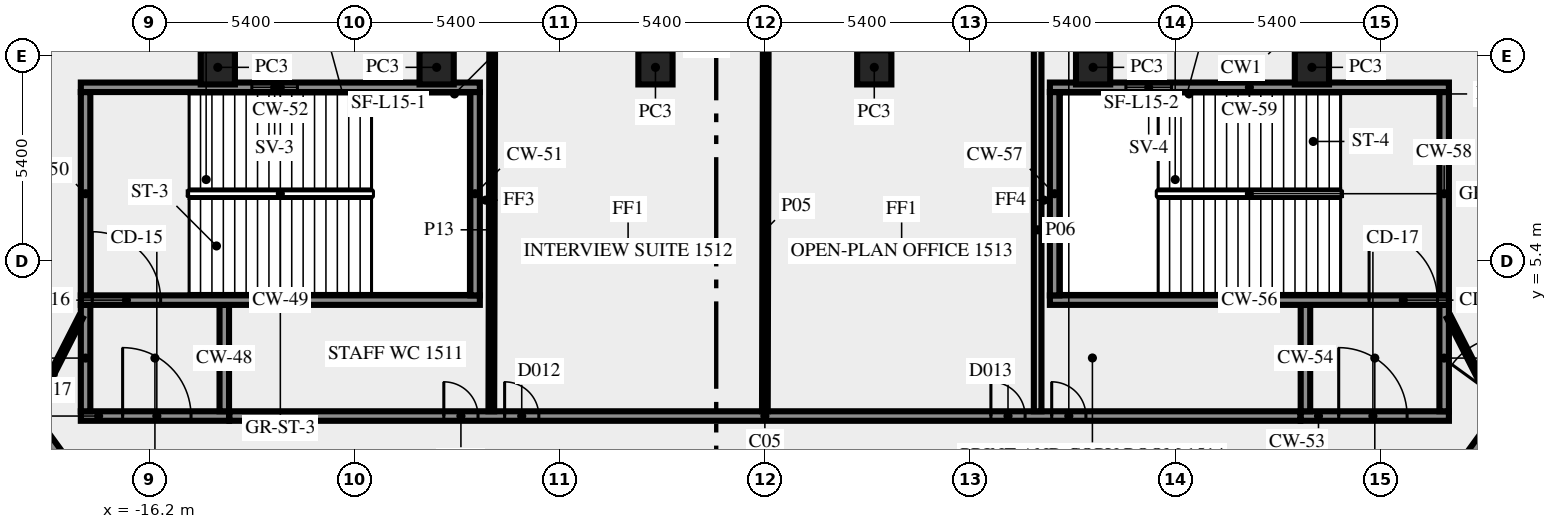
"""IFC4 building model, lengths in metres.
Left out: names, types, materials, properties, quantities, classifications, styles, units other than length and angle.
Written with IfcOpenShell. Run it as: python <this file> out.ifc"""

import sys

from ifc_helpers import new_model, si_unit, direction, frame, frame_2d, origin, origin_2d, place, context, subcontext, project, spatial, rectangle, extrude, element, fill, save


model = new_model("IFC4")
c1 = context("Model", 3, precision=1e-05, world=origin(), true_north=direction((0.0, 1.0)))
c2 = subcontext(c1, "Body", "Model", "MODEL_VIEW")
j1 = project(units=[si_unit("LENGTHUNIT", "METRE"), si_unit("PLANEANGLEUNIT", "RADIAN")], contexts=[c1])
p1 = place(None, origin())
s1 = spatial("IfcSite", under=j1, at=p1, CompositionType="ELEMENT")
p2 = place(p1, origin())
s2 = spatial("IfcBuilding", under=s1, at=p2, CompositionType="ELEMENT")
p3 = place(p2, frame((0.0, 0.0, 67.0)))
s3 = spatial("IfcBuildingStorey", under=s2, at=p3, CompositionType="ELEMENT", Elevation=67.0)
for number, where, z_axis, x_axis in (
    (1, (14.395, 10.5, 0.0), (0.0, 0.0, 1.0), (-1.0, 0.0, 0.0)),
    (2, (8.637, 10.5, 0.0), (0.0, 0.0, 1.0), (-1.0, 0.0, 0.0)),
    (3, (2.879, 10.5, 0.0), (0.0, 0.0, 1.0), (-1.0, 0.0, 0.0)),
    (4, (-2.879, 10.5, 0.0), (0.0, 0.0, 1.0), (-1.0, 0.0, 0.0)),
    (5, (-8.637, 10.5, 0.0), (0.0, 0.0, 1.0), (-1.0, 0.0, 0.0)),
    (6, (-14.395, 10.5, 0.0), (0.0, 0.0, 1.0), (-1.0, 0.0, 0.0)),
):
    element("IfcColumn", number, at=place(p3, frame(where, z_axis=z_axis, x_axis=x_axis)), inside=s3, PredefinedType="COLUMN", context=c2, shape_type="SweptSolid", body=[
        extrude(rectangle(XDim=0.9, YDim=0.9, at=origin_2d()), origin(), (0.0, 0.0, 1.0), 3.65),
    ])
p4 = place(p3, frame((-18.0, 1.325, 0.0), z_axis=(0.0, 0.0, 1.0), x_axis=(1.0, 0.0, 0.0)))
e7 = element("IfcWall", 7, at=p4, inside=s3, PredefinedType="SHEAR", context=c2, shape_type="SweptSolid", body=[
    extrude(rectangle(XDim=3.9, YDim=0.25, at=frame_2d((1.95, 0.0))), origin(), (0.0, 0.0, 1.0), 3.65),
])
p5 = place(p4, frame((1.1, 0.0, 0.0)))
e8 = element("IfcOpeningElement", 8, at=p5, cuts=e7, PredefinedType="OPENING", context=c2, shape_type="SweptSolid", body=[
    extrude(rectangle(XDim=1.8, YDim=2.1, at=frame_2d((0.9, 1.05))), frame((0.0, 0.135, 0.0), z_axis=(0.0, -1.0, 0.0), x_axis=(1.0, 0.0, 0.0)), (0.0, 0.0, 1.0), 0.27),
])
for number, where, z_axis, x_axis in (
    (9, (-17.875, 1.45, 0.0), (0.0, 0.0, 1.0), (0.0, 1.0, 0.0)),
    (10, (-14.225, 1.45, 0.0), (0.0, 0.0, 1.0), (0.0, 1.0, 0.0)),
):
    element("IfcWall", number, at=place(p3, frame(where, z_axis=z_axis, x_axis=x_axis)), inside=s3, PredefinedType="SHEAR", context=c2, shape_type="SweptSolid", body=[
        extrude(rectangle(XDim=2.8, YDim=0.25, at=frame_2d((1.4, 0.0))), origin(), (0.0, 0.0, 1.0), 3.65),
    ])
p6 = place(p3, frame((-18.0, 4.375, 0.0), z_axis=(0.0, 0.0, 1.0), x_axis=(1.0, 0.0, 0.0)))
e11 = element("IfcWall", 11, at=p6, inside=s3, PredefinedType="SHEAR", context=c2, shape_type="SweptSolid", body=[
    extrude(rectangle(XDim=10.5, YDim=0.25, at=frame_2d((5.25, 0.0))), origin(), (0.0, 0.0, 1.0), 3.65),
])
p7 = place(p6, frame((0.3, 0.0, 0.0)))
e12 = element("IfcOpeningElement", 12, at=p7, cuts=e11, PredefinedType="OPENING", context=c2, shape_type="SweptSolid", body=[
    extrude(rectangle(XDim=1.8, YDim=2.1, at=frame_2d((0.9, 1.05))), frame((0.0, 0.135, 0.0), z_axis=(0.0, -1.0, 0.0), x_axis=(1.0, 0.0, 0.0)), (0.0, 0.0, 1.0), 0.27),
])
for number, where, z_axis, x_axis in (
    (13, (-17.875, 4.5, 0.0), (0.0, 0.0, 1.0), (0.0, 1.0, 0.0)),
    (14, (-7.625, 4.5, 0.0), (0.0, 0.0, 1.0), (0.0, 1.0, 0.0)),
):
    element("IfcWall", number, at=place(p3, frame(where, z_axis=z_axis, x_axis=x_axis)), inside=s3, PredefinedType="SHEAR", context=c2, shape_type="SweptSolid", body=[
        extrude(rectangle(XDim=5.35, YDim=0.25, at=frame_2d((2.675, 0.0))), origin(), (0.0, 0.0, 1.0), 3.65),
    ])
p8 = place(p3, frame((-18.0, 9.975, 0.0), z_axis=(0.0, 0.0, 1.0), x_axis=(1.0, 0.0, 0.0)))
e15 = element("IfcWall", 15, at=p8, inside=s3, PredefinedType="SHEAR", context=c2, shape_type="SweptSolid", body=[
    extrude(rectangle(XDim=10.5, YDim=0.25, at=frame_2d((5.25, 0.0))), origin(), (0.0, 0.0, 1.0), 3.65),
])
p9 = place(p8, frame((4.5, 0.0, 1.0)))
e16 = element("IfcOpeningElement", 16, at=p9, cuts=e15, PredefinedType="OPENING", context=c2, shape_type="SweptSolid", body=[
    extrude(rectangle(XDim=1.2, YDim=1.2, at=frame_2d((0.6, 0.6))), frame((0.0, 0.135, 0.0), z_axis=(0.0, -1.0, 0.0), x_axis=(1.0, 0.0, 0.0)), (0.0, 0.0, 1.0), 0.27),
])
p10 = place(p3, frame((14.1, 1.325, 0.0), z_axis=(0.0, 0.0, 1.0), x_axis=(1.0, 0.0, 0.0)))
e17 = element("IfcWall", 17, at=p10, inside=s3, PredefinedType="SHEAR", context=c2, shape_type="SweptSolid", body=[
    extrude(rectangle(XDim=3.9, YDim=0.25, at=frame_2d((1.95, 0.0))), origin(), (0.0, 0.0, 1.0), 3.65),
])
p11 = place(p10, frame((1.0, 0.0, 0.0)))
e18 = element("IfcOpeningElement", 18, at=p11, cuts=e17, PredefinedType="OPENING", context=c2, shape_type="SweptSolid", body=[
    extrude(rectangle(XDim=1.8, YDim=2.1, at=frame_2d((0.9, 1.05))), frame((0.0, 0.135, 0.0), z_axis=(0.0, -1.0, 0.0), x_axis=(1.0, 0.0, 0.0)), (0.0, 0.0, 1.0), 0.27),
])
for number, where, z_axis, x_axis in (
    (19, (14.225, 1.45, 0.0), (0.0, 0.0, 1.0), (0.0, 1.0, 0.0)),
    (20, (17.875, 1.45, 0.0), (0.0, 0.0, 1.0), (0.0, 1.0, 0.0)),
):
    element("IfcWall", number, at=place(p3, frame(where, z_axis=z_axis, x_axis=x_axis)), inside=s3, PredefinedType="SHEAR", context=c2, shape_type="SweptSolid", body=[
        extrude(rectangle(XDim=2.8, YDim=0.25, at=frame_2d((1.4, 0.0))), origin(), (0.0, 0.0, 1.0), 3.65),
    ])
p12 = place(p3, frame((7.5, 4.375, 0.0), z_axis=(0.0, 0.0, 1.0), x_axis=(1.0, 0.0, 0.0)))
e21 = element("IfcWall", 21, at=p12, inside=s3, PredefinedType="SHEAR", context=c2, shape_type="SweptSolid", body=[
    extrude(rectangle(XDim=10.5, YDim=0.25, at=frame_2d((5.25, 0.0))), origin(), (0.0, 0.0, 1.0), 3.65),
])
p13 = place(p12, frame((8.4, 0.0, 0.0)))
e22 = element("IfcOpeningElement", 22, at=p13, cuts=e21, PredefinedType="OPENING", context=c2, shape_type="SweptSolid", body=[
    extrude(rectangle(XDim=1.8, YDim=2.1, at=frame_2d((0.9, 1.05))), frame((0.0, 0.135, 0.0), z_axis=(0.0, -1.0, 0.0), x_axis=(1.0, 0.0, 0.0)), (0.0, 0.0, 1.0), 0.27),
])
for number, where, z_axis, x_axis in (
    (23, (7.625, 4.5, 0.0), (0.0, 0.0, 1.0), (0.0, 1.0, 0.0)),
    (24, (17.875, 4.5, 0.0), (0.0, 0.0, 1.0), (0.0, 1.0, 0.0)),
):
    element("IfcWall", number, at=place(p3, frame(where, z_axis=z_axis, x_axis=x_axis)), inside=s3, PredefinedType="SHEAR", context=c2, shape_type="SweptSolid", body=[
        extrude(rectangle(XDim=5.35, YDim=0.25, at=frame_2d((2.675, 0.0))), origin(), (0.0, 0.0, 1.0), 3.65),
    ])
p14 = place(p3, frame((7.5, 9.975, 0.0), z_axis=(0.0, 0.0, 1.0), x_axis=(1.0, 0.0, 0.0)))
e25 = element("IfcWall", 25, at=p14, inside=s3, PredefinedType="SHEAR", context=c2, shape_type="SweptSolid", body=[
    extrude(rectangle(XDim=10.5, YDim=0.25, at=frame_2d((5.25, 0.0))), origin(), (0.0, 0.0, 1.0), 3.65),
])
p15 = place(p14, frame((2.0, 0.0, 1.0)))
e26 = element("IfcOpeningElement", 26, at=p15, cuts=e25, PredefinedType="OPENING", context=c2, shape_type="SweptSolid", body=[
    extrude(rectangle(XDim=1.2, YDim=1.2, at=frame_2d((0.6, 0.6))), frame((0.0, 0.135, 0.0), z_axis=(0.0, -1.0, 0.0), x_axis=(1.0, 0.0, 0.0)), (0.0, 0.0, 1.0), 0.27),
])
p16 = place(p3, frame((-37.232, 25.972, 0.0), z_axis=(0.0, 0.0, 1.0), x_axis=(0.587786323093, -0.809016216391, 0.0)))
e27 = element("IfcWall", 27, at=p16, inside=s3, PredefinedType="SOLIDWALL", context=c2, shape_type="SweptSolid", body=[
    extrude(rectangle(XDim=33.493, YDim=0.25, at=frame_2d((16.747, 0.0))), origin(), (0.0, 0.0, 1.0), 3.65),
])
p17 = place(p16, frame((16.435, 0.0, 0.0)))
e28 = element("IfcOpeningElement", 28, at=p17, cuts=e27, PredefinedType="OPENING", context=c2, shape_type="SweptSolid", body=[
    extrude(rectangle(XDim=0.9, YDim=2.1, at=frame_2d((0.45, 1.05))), frame((0.0, 0.135, 0.0), z_axis=(0.0, -1.0, 0.0), x_axis=(1.0, 0.0, 0.0)), (0.0, 0.0, 1.0), 0.27),
])
p18 = place(p16, frame((7.137, 0.0, 0.0)))
e29 = element("IfcOpeningElement", 29, at=p18, cuts=e27, PredefinedType="OPENING", context=c2, shape_type="SweptSolid", body=[
    extrude(rectangle(XDim=1.8, YDim=2.1, at=frame_2d((0.9, 1.05))), frame((0.0, 0.135, 0.0), z_axis=(0.0, -1.0, 0.0), x_axis=(1.0, 0.0, 0.0)), (0.0, 0.0, 1.0), 0.27),
])
p19 = place(p3, frame((-14.09, 1.325, 0.0), z_axis=(0.0, 0.0, 1.0), x_axis=(1.0, 0.0, 0.0)))
e30 = element("IfcWall", 30, at=p19, inside=s3, PredefinedType="SOLIDWALL", context=c2, shape_type="SweptSolid", body=[
    extrude(rectangle(XDim=28.18, YDim=0.25, at=frame_2d((14.09, 0.0))), origin(), (0.0, 0.0, 1.0), 3.65),
])
p20 = place(p19, frame((20.038, 0.0, 0.0)))
e31 = element("IfcOpeningElement", 31, at=p20, cuts=e30, PredefinedType="OPENING", context=c2, shape_type="SweptSolid", body=[
    extrude(rectangle(XDim=0.9, YDim=2.1, at=frame_2d((0.45, 1.05))), frame((0.0, 0.135, 0.0), z_axis=(0.0, -1.0, 0.0), x_axis=(1.0, 0.0, 0.0)), (0.0, 0.0, 1.0), 0.27),
])
p21 = place(p19, frame((7.242, 0.0, 0.0)))
e32 = element("IfcOpeningElement", 32, at=p21, cuts=e30, PredefinedType="OPENING", context=c2, shape_type="SweptSolid", body=[
    extrude(rectangle(XDim=0.9, YDim=2.1, at=frame_2d((0.45, 1.05))), frame((0.0, 0.135, 0.0), z_axis=(0.0, -1.0, 0.0), x_axis=(1.0, 0.0, 0.0)), (0.0, 0.0, 1.0), 0.27),
])
p22 = place(p19, frame((21.638, 0.0, 0.0)))
e33 = element("IfcOpeningElement", 33, at=p22, cuts=e30, PredefinedType="OPENING", context=c2, shape_type="SweptSolid", body=[
    extrude(rectangle(XDim=0.9, YDim=2.1, at=frame_2d((0.45, 1.05))), frame((0.0, 0.135, 0.0), z_axis=(0.0, -1.0, 0.0), x_axis=(1.0, 0.0, 0.0)), (0.0, 0.0, 1.0), 0.27),
])
p23 = place(p19, frame((5.642, 0.0, 0.0)))
e34 = element("IfcOpeningElement", 34, at=p23, cuts=e30, PredefinedType="OPENING", context=c2, shape_type="SweptSolid", body=[
    extrude(rectangle(XDim=0.9, YDim=2.1, at=frame_2d((0.45, 1.05))), frame((0.0, 0.135, 0.0), z_axis=(0.0, -1.0, 0.0), x_axis=(1.0, 0.0, 0.0)), (0.0, 0.0, 1.0), 0.27),
])
p24 = place(p3, frame((17.545, -1.125, 0.0), z_axis=(0.0, 0.0, 1.0), x_axis=(0.587786323093, 0.809016216391, 0.0)))
e35 = element("IfcWall", 35, at=p24, inside=s3, PredefinedType="SOLIDWALL", context=c2, shape_type="SweptSolid", body=[
    extrude(rectangle(XDim=33.493, YDim=0.25, at=frame_2d((16.747, 0.0))), origin(), (0.0, 0.0, 1.0), 3.65),
])
p25 = place(p24, frame((27.458, 0.0, 0.0)))
e36 = element("IfcOpeningElement", 36, at=p25, cuts=e35, PredefinedType="OPENING", context=c2, shape_type="SweptSolid", body=[
    extrude(rectangle(XDim=1.8, YDim=2.1, at=frame_2d((0.9, 1.05))), frame((0.0, 0.135, 0.0), z_axis=(0.0, -1.0, 0.0), x_axis=(1.0, 0.0, 0.0)), (0.0, 0.0, 1.0), 0.27),
])
p26 = place(p24, frame((3.392, 0.0, 0.0)))
e37 = element("IfcOpeningElement", 37, at=p26, cuts=e35, PredefinedType="OPENING", context=c2, shape_type="SweptSolid", body=[
    extrude(rectangle(XDim=1.8, YDim=2.1, at=frame_2d((0.9, 1.05))), frame((0.0, 0.135, 0.0), z_axis=(0.0, -1.0, 0.0), x_axis=(1.0, 0.0, 0.0)), (0.0, 0.0, 1.0), 0.27),
])
p27 = place(p24, frame((32.253, 0.0, 0.0)))
e38 = element("IfcOpeningElement", 38, at=p27, cuts=e35, PredefinedType="OPENING", context=c2, shape_type="SweptSolid", body=[
    extrude(rectangle(XDim=0.9, YDim=2.1, at=frame_2d((0.45, 1.05))), frame((0.0, 0.135, 0.0), z_axis=(0.0, -1.0, 0.0), x_axis=(1.0, 0.0, 0.0)), (0.0, 0.0, 1.0), 0.27),
])
p28 = place(p3, frame((0.023, 11.0, 0.0), z_axis=(0.0, 0.0, 1.0), x_axis=(-0.002377476217, -0.999997173799, 0.0)))
e39 = element("IfcWall", 39, at=p28, inside=s3, PredefinedType="PARTITIONING", context=c2, shape_type="SweptSolid", body=[
    extrude(rectangle(XDim=9.55, YDim=0.15, at=frame_2d((4.775, 0.0))), origin(), (0.0, 0.0, 1.0), 2.75),
])
p29 = place(p3, frame((7.178, 1.45, 0.0), z_axis=(0.0, 0.0, 1.0), x_axis=(0.0, 1.0, 0.0)))
e40 = element("IfcWall", 40, at=p29, inside=s3, PredefinedType="SOLIDWALL", context=c2, shape_type="SweptSolid", body=[
    extrude(rectangle(XDim=9.55, YDim=0.2, at=frame_2d((4.775, 0.0))), origin(), (0.0, 0.0, 1.0), 2.75),
])
p30 = place(p3, frame((-7.175, 11.0, 0.0), z_axis=(0.0, 0.0, 1.0), x_axis=(-0.002377476217, -0.999997173799, 0.0)))
e41 = element("IfcWall", 41, at=p30, inside=s3, PredefinedType="PARTITIONING", context=c2, shape_type="SweptSolid", body=[
    extrude(rectangle(XDim=9.55, YDim=0.15, at=frame_2d((4.775, 0.0))), origin(), (0.0, 0.0, 1.0), 2.75),
])
for number, where, z_axis, x_axis in (
    (42, (-19.261, 1.45, 0.0), (0.0, 0.0, 1.0), (0.454, 0.891, 0.0)),
    (43, (18.0, 3.925, 0.0), (0.0, 0.0, 1.0), (0.454, -0.891, 0.0)),
):
    element("IfcWall", number, at=place(p3, frame(where, z_axis=z_axis, x_axis=x_axis)), inside=s3, PredefinedType="PARTITIONING", context=c2, shape_type="SweptSolid", body=[
        extrude(rectangle(XDim=2.778, YDim=0.12, at=frame_2d((1.389, 0.0))), origin(), (0.0, 0.0, 1.0), 3.65),
    ])
p31 = place(p5, origin())
e44 = element("IfcDoor", 44, at=p31, inside=s3, OperationType="DOUBLE_DOOR_SINGLE_SWING", PredefinedType="DOOR", context=c2, shape_type="SweptSolid", body=[
    extrude(rectangle(XDim=1.8, YDim=2.1, at=frame_2d((0.9, 1.05))), frame((0.0, 0.025, 0.0), z_axis=(0.0, -1.0, 0.0), x_axis=(1.0, 0.0, 0.0)), (0.0, 0.0, 1.0), 0.05),
])
fill(e8, e44)
p32 = place(p7, origin())
e45 = element("IfcDoor", 45, at=p32, inside=s3, OperationType="DOUBLE_DOOR_SINGLE_SWING", PredefinedType="DOOR", context=c2, shape_type="SweptSolid", body=[
    extrude(rectangle(XDim=1.8, YDim=2.1, at=frame_2d((0.9, 1.05))), frame((0.0, 0.025, 0.0), z_axis=(0.0, -1.0, 0.0), x_axis=(1.0, 0.0, 0.0)), (0.0, 0.0, 1.0), 0.05),
])
fill(e12, e45)
p33 = place(p9, origin())
e46 = element("IfcWindow", 46, at=p33, inside=s3, PartitioningType="SINGLE_PANEL", PredefinedType="WINDOW", context=c2, shape_type="SweptSolid", body=[
    extrude(rectangle(XDim=1.2, YDim=1.2, at=frame_2d((0.6, 0.6))), frame((0.0, 0.03, 0.0), z_axis=(0.0, -1.0, 0.0), x_axis=(1.0, 0.0, 0.0)), (0.0, 0.0, 1.0), 0.06),
])
fill(e16, e46)
p34 = place(p11, origin())
e47 = element("IfcDoor", 47, at=p34, inside=s3, OperationType="DOUBLE_DOOR_SINGLE_SWING", PredefinedType="DOOR", context=c2, shape_type="SweptSolid", body=[
    extrude(rectangle(XDim=1.8, YDim=2.1, at=frame_2d((0.9, 1.05))), frame((0.0, 0.025, 0.0), z_axis=(0.0, -1.0, 0.0), x_axis=(1.0, 0.0, 0.0)), (0.0, 0.0, 1.0), 0.05),
])
fill(e18, e47)
p35 = place(p13, origin())
e48 = element("IfcDoor", 48, at=p35, inside=s3, OperationType="DOUBLE_DOOR_SINGLE_SWING", PredefinedType="DOOR", context=c2, shape_type="SweptSolid", body=[
    extrude(rectangle(XDim=1.8, YDim=2.1, at=frame_2d((0.9, 1.05))), frame((0.0, 0.025, 0.0), z_axis=(0.0, -1.0, 0.0), x_axis=(1.0, 0.0, 0.0)), (0.0, 0.0, 1.0), 0.05),
])
fill(e22, e48)
p36 = place(p15, origin())
e49 = element("IfcWindow", 49, at=p36, inside=s3, PartitioningType="SINGLE_PANEL", PredefinedType="WINDOW", context=c2, shape_type="SweptSolid", body=[
    extrude(rectangle(XDim=1.2, YDim=1.2, at=frame_2d((0.6, 0.6))), frame((0.0, 0.03, 0.0), z_axis=(0.0, -1.0, 0.0), x_axis=(1.0, 0.0, 0.0)), (0.0, 0.0, 1.0), 0.06),
])
fill(e26, e49)
p37 = place(p20, origin())
e50 = element("IfcDoor", 50, at=p37, inside=s3, OperationType="SINGLE_SWING_RIGHT", PredefinedType="DOOR", context=c2, shape_type="SweptSolid", body=[
    extrude(rectangle(XDim=0.9, YDim=2.1, at=frame_2d((0.45, 1.05))), frame((0.0, 0.025, 0.0), z_axis=(0.0, -1.0, 0.0), x_axis=(1.0, 0.0, 0.0)), (0.0, 0.0, 1.0), 0.05),
])
fill(e31, e50)
p38 = place(p21, origin())
e51 = element("IfcDoor", 51, at=p38, inside=s3, OperationType="SINGLE_SWING_LEFT", PredefinedType="DOOR", context=c2, shape_type="SweptSolid", body=[
    extrude(rectangle(XDim=0.9, YDim=2.1, at=frame_2d((0.45, 1.05))), frame((0.0, 0.025, 0.0), z_axis=(0.0, -1.0, 0.0), x_axis=(1.0, 0.0, 0.0)), (0.0, 0.0, 1.0), 0.05),
])
fill(e32, e51)
p39 = place(p22, origin())
e52 = element("IfcDoor", 52, at=p39, inside=s3, OperationType="SINGLE_SWING_LEFT", PredefinedType="DOOR", context=c2, shape_type="SweptSolid", body=[
    extrude(rectangle(XDim=0.9, YDim=2.1, at=frame_2d((0.45, 1.05))), frame((0.0, 0.025, 0.0), z_axis=(0.0, -1.0, 0.0), x_axis=(1.0, 0.0, 0.0)), (0.0, 0.0, 1.0), 0.05),
])
fill(e33, e52)
p40 = place(p23, origin())
e53 = element("IfcDoor", 53, at=p40, inside=s3, OperationType="SINGLE_SWING_RIGHT", PredefinedType="DOOR", context=c2, shape_type="SweptSolid", body=[
    extrude(rectangle(XDim=0.9, YDim=2.1, at=frame_2d((0.45, 1.05))), frame((0.0, 0.025, 0.0), z_axis=(0.0, -1.0, 0.0), x_axis=(1.0, 0.0, 0.0)), (0.0, 0.0, 1.0), 0.05),
])
fill(e34, e53)
save(model, sys.argv[1])
